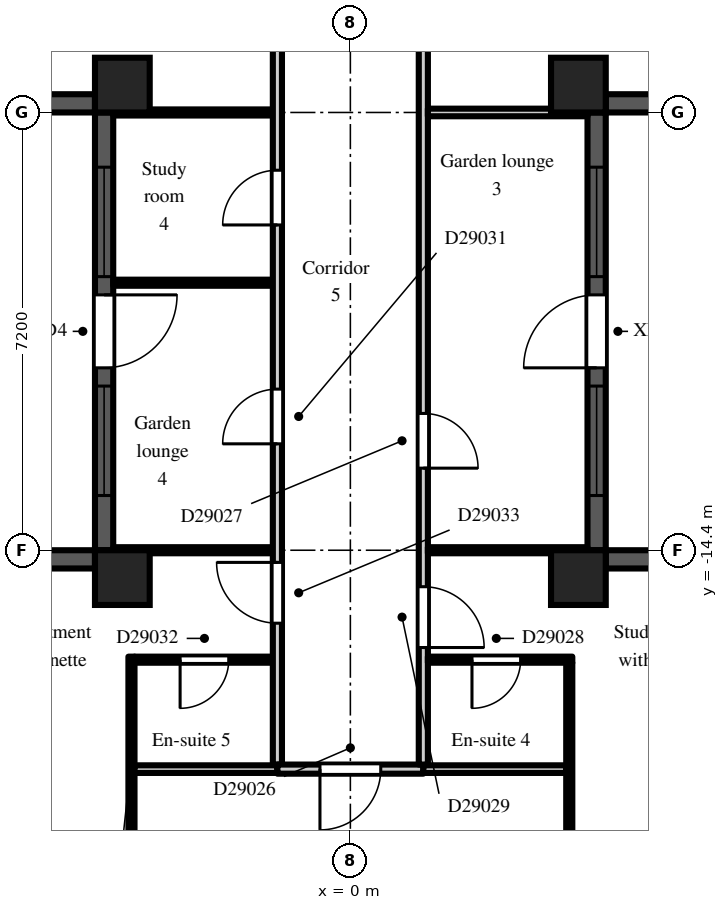
"""IFC4 building model, lengths in metres.
Left out: names, types, materials, properties, quantities, classifications, styles, units other than length and angle.
Written with IfcOpenShell. Run it as: python <this file> out.ifc"""

import sys

from ifc_helpers import new_model, si_unit, direction, frame, frame_2d, origin, origin_2d, place, context, subcontext, project, spatial, rectangle, extrude, element, fill, save


model = new_model("IFC4")
c1 = context("Model", 3, precision=1e-05, world=origin(), true_north=direction((0.0, 1.0)))
c2 = subcontext(c1, "Body", "Model", "MODEL_VIEW")
j1 = project(units=[si_unit("LENGTHUNIT", "METRE"), si_unit("PLANEANGLEUNIT", "RADIAN")], contexts=[c1])
p1 = place(None, origin())
s1 = spatial("IfcSite", under=j1, at=p1, CompositionType="ELEMENT")
p2 = place(p1, origin())
s2 = spatial("IfcBuilding", under=s1, at=p2, CompositionType="ELEMENT")
p3 = place(p2, frame((0.0, 0.0, 198.9)))
s3 = spatial("IfcBuildingStorey", under=s2, at=p3, CompositionType="ELEMENT", Elevation=198.9)
for number, where, z_axis, x_axis in (
    (1, (-3.75, -14.85, 0.0), (0.0, 0.0, 1.0), (1.0, 0.0, 0.0)),
    (2, (-3.75, -6.75, 0.0), (0.0, 0.0, 1.0), (1.0, 0.0, 0.0)),
    (3, (3.75, -14.85, 0.0), (0.0, 0.0, 1.0), (1.0, 0.0, 0.0)),
    (4, (3.75, -6.75, 0.0), (0.0, 0.0, 1.0), (1.0, 0.0, 0.0)),
):
    element("IfcColumn", number, at=place(p3, frame(where, z_axis=z_axis, x_axis=x_axis)), inside=s3, PredefinedType="COLUMN", context=c2, shape_type="SweptSolid", body=[
        extrude(rectangle(XDim=0.9, YDim=0.9, at=origin_2d()), origin(), (0.0, 0.0, 1.0), 3.0),
    ])
p4 = place(p3, frame((-7.2, -7.05, 0.0), z_axis=(0.0, 0.0, 1.0), x_axis=(1.0, 0.0, 0.0)))
e5 = element("IfcWall", 5, at=p4, inside=s3, PredefinedType="SOLIDWALL", context=c2, shape_type="SweptSolid", body=[
    extrude(rectangle(XDim=3.0, YDim=0.3, at=frame_2d((1.5, 0.0))), origin(), (0.0, 0.0, 1.0), 2.3),
])
p5 = place(p3, frame((-4.05, -7.2, 0.0), z_axis=(0.0, 0.0, 1.0), x_axis=(0.0, -1.0, 0.0)))
e6 = element("IfcWall", 6, at=p5, inside=s3, PredefinedType="SOLIDWALL", context=c2, shape_type="SweptSolid", body=[
    extrude(rectangle(XDim=7.2, YDim=0.3, at=frame_2d((3.6, 0.0))), origin(), (0.0, 0.0, 1.0), 2.3),
])
p6 = place(p5, frame((3.0, 0.0, 0.0)))
e7 = element("IfcOpeningElement", 7, at=p6, cuts=e6, PredefinedType="OPENING", context=c2, shape_type="SweptSolid", body=[
    extrude(rectangle(XDim=1.2, YDim=2.05, at=frame_2d((0.6, 1.025))), frame((0.0, 0.16, 0.0), z_axis=(0.0, -1.0, 0.0), x_axis=(1.0, 0.0, 0.0)), (0.0, 0.0, 1.0), 0.32),
])
p7 = place(p5, frame((0.9, 0.0, 0.2)))
e8 = element("IfcOpeningElement", 8, at=p7, cuts=e6, PredefinedType="OPENING", context=c2, shape_type="SweptSolid", body=[
    extrude(rectangle(XDim=1.8, YDim=1.85, at=frame_2d((0.9, 0.925))), frame((0.0, 0.16, 0.0), z_axis=(0.0, -1.0, 0.0), x_axis=(1.0, 0.0, 0.0)), (0.0, 0.0, 1.0), 0.32),
])
p8 = place(p5, frame((4.5, 0.0, 0.2)))
e9 = element("IfcOpeningElement", 9, at=p8, cuts=e6, PredefinedType="OPENING", context=c2, shape_type="SweptSolid", body=[
    extrude(rectangle(XDim=1.8, YDim=1.85, at=frame_2d((0.9, 0.925))), frame((0.0, 0.16, 0.0), z_axis=(0.0, -1.0, 0.0), x_axis=(1.0, 0.0, 0.0)), (0.0, 0.0, 1.0), 0.32),
])
for number, where, z_axis, x_axis in (
    (10, (-4.2, -14.55, 0.0), (0.0, 0.0, 1.0), (-1.0, 0.0, 0.0)),
    (11, (6.3, -14.55, 0.0), (0.0, 0.0, 1.0), (-1.0, 0.0, 0.0)),
):
    element("IfcWall", number, at=place(p3, frame(where, z_axis=z_axis, x_axis=x_axis)), inside=s3, PredefinedType="SOLIDWALL", context=c2, shape_type="SweptSolid", body=[
        extrude(rectangle(XDim=2.1, YDim=0.3, at=frame_2d((1.05, 0.0))), origin(), (0.0, 0.0, 1.0), 2.3),
    ])
p9 = place(p3, frame((4.05, -14.4, 0.0), z_axis=(0.0, 0.0, 1.0), x_axis=(0.0, 1.0, 0.0)))
e12 = element("IfcWall", 12, at=p9, inside=s3, PredefinedType="SOLIDWALL", context=c2, shape_type="SweptSolid", body=[
    extrude(rectangle(XDim=7.2, YDim=0.3, at=frame_2d((3.6, 0.0))), origin(), (0.0, 0.0, 1.0), 2.3),
])
p10 = place(p9, frame((3.0, 0.0, 0.0)))
e13 = element("IfcOpeningElement", 13, at=p10, cuts=e12, PredefinedType="OPENING", context=c2, shape_type="SweptSolid", body=[
    extrude(rectangle(XDim=1.2, YDim=2.05, at=frame_2d((0.6, 1.025))), frame((0.0, 0.16, 0.0), z_axis=(0.0, -1.0, 0.0), x_axis=(1.0, 0.0, 0.0)), (0.0, 0.0, 1.0), 0.32),
])
p11 = place(p9, frame((0.9, 0.0, 0.2)))
e14 = element("IfcOpeningElement", 14, at=p11, cuts=e12, PredefinedType="OPENING", context=c2, shape_type="SweptSolid", body=[
    extrude(rectangle(XDim=1.8, YDim=1.85, at=frame_2d((0.9, 0.925))), frame((0.0, 0.16, 0.0), z_axis=(0.0, -1.0, 0.0), x_axis=(1.0, 0.0, 0.0)), (0.0, 0.0, 1.0), 0.32),
])
p12 = place(p9, frame((4.5, 0.0, 0.2)))
e15 = element("IfcOpeningElement", 15, at=p12, cuts=e12, PredefinedType="OPENING", context=c2, shape_type="SweptSolid", body=[
    extrude(rectangle(XDim=1.8, YDim=1.85, at=frame_2d((0.9, 0.925))), frame((0.0, 0.16, 0.0), z_axis=(0.0, -1.0, 0.0), x_axis=(1.0, 0.0, 0.0)), (0.0, 0.0, 1.0), 0.32),
])
p13 = place(p3, frame((4.2, -7.05, 0.0), z_axis=(0.0, 0.0, 1.0), x_axis=(1.0, 0.0, 0.0)))
e16 = element("IfcWall", 16, at=p13, inside=s3, PredefinedType="SOLIDWALL", context=c2, shape_type="SweptSolid", body=[
    extrude(rectangle(XDim=3.0, YDim=0.3, at=frame_2d((1.5, 0.0))), origin(), (0.0, 0.0, 1.0), 2.3),
])
for number, where, z_axis, x_axis in (
    (17, (-3.9, -14.4, 0.0), (0.0, 0.0, 1.0), (1.0, 0.0, 0.0)),
    (18, (-3.9, -10.0, 0.0), (0.0, 0.0, 1.0), (1.0, 0.0, 0.0)),
    (19, (-3.9, -7.2, 0.0), (0.0, 0.0, 1.0), (1.0, 0.0, 0.0)),
):
    element("IfcWall", number, at=place(p3, frame(where, z_axis=z_axis, x_axis=x_axis)), inside=s3, PredefinedType="PARTITIONING", context=c2, shape_type="SweptSolid", body=[
        extrude(rectangle(XDim=2.625, YDim=0.1, at=frame_2d((1.312, 0.0))), origin(), (0.0, 0.0, 1.0), 2.6),
    ])
p14 = place(p3, frame((-3.6, -19.5, 0.0), z_axis=(0.0, 0.0, 1.0), x_axis=(0.0, 1.0, 0.0)))
e20 = element("IfcWall", 20, at=p14, inside=s3, PredefinedType="PARTITIONING", context=c2, shape_type="SweptSolid", body=[
    extrude(rectangle(XDim=3.35, YDim=0.1, at=frame_2d((1.675, 0.0))), origin(), (0.0, 0.0, 1.0), 2.6),
])
p15 = place(p3, frame((-3.55, -18.0, 0.0), z_axis=(0.0, 0.0, 1.0), x_axis=(1.0, 0.0, 0.0)))
e21 = element("IfcWall", 21, at=p15, inside=s3, PredefinedType="PARTITIONING", context=c2, shape_type="SweptSolid", body=[
    extrude(rectangle(XDim=2.35, YDim=0.125, at=frame_2d((1.175, 0.0))), origin(), (0.0, 0.0, 1.0), 2.6),
])
p16 = place(p3, frame((-3.55, -16.2, 0.0), z_axis=(0.0, 0.0, 1.0), x_axis=(1.0, 0.0, 0.0)))
e22 = element("IfcWall", 22, at=p16, inside=s3, PredefinedType="PARTITIONING", context=c2, shape_type="SweptSolid", body=[
    extrude(rectangle(XDim=2.275, YDim=0.1, at=frame_2d((1.138, 0.0))), origin(), (0.0, 0.0, 1.0), 2.6),
])
p17 = place(p16, frame((0.75, 0.0, 0.0)))
e23 = element("IfcOpeningElement", 23, at=p17, cuts=e22, PredefinedType="OPENING", context=c2, shape_type="SweptSolid", body=[
    extrude(rectangle(XDim=0.8, YDim=2.1, at=frame_2d((0.4, 1.05))), frame((0.0, 0.06, 0.0), z_axis=(0.0, -1.0, 0.0), x_axis=(1.0, 0.0, 0.0)), (0.0, 0.0, 1.0), 0.12),
])
p18 = place(p3, frame((-1.2, -17.925, 0.0), z_axis=(0.0, 0.0, 1.0), x_axis=(0.0, 1.0, 0.0)))
e24 = element("IfcWall", 24, at=p18, inside=s3, PredefinedType="PARTITIONING", context=c2, shape_type="SweptSolid", body=[
    extrude(rectangle(XDim=16.65, YDim=0.15, at=frame_2d((8.325, 0.0))), origin(), (0.0, 0.0, 1.0), 2.6),
])
p19 = place(p18, frame((12.175, 0.0, 0.0)))
e25 = element("IfcOpeningElement", 25, at=p19, cuts=e24, PredefinedType="OPENING", context=c2, shape_type="SweptSolid", body=[
    extrude(rectangle(XDim=0.9, YDim=2.1, at=frame_2d((0.45, 1.05))), frame((0.0, 0.085, 0.0), z_axis=(0.0, -1.0, 0.0), x_axis=(1.0, 0.0, 0.0)), (0.0, 0.0, 1.0), 0.17),
])
p20 = place(p18, frame((8.875, 0.0, 0.0)))
e26 = element("IfcOpeningElement", 26, at=p20, cuts=e24, PredefinedType="OPENING", context=c2, shape_type="SweptSolid", body=[
    extrude(rectangle(XDim=0.9, YDim=2.1, at=frame_2d((0.45, 1.05))), frame((0.0, 0.085, 0.0), z_axis=(0.0, -1.0, 0.0), x_axis=(1.0, 0.0, 0.0)), (0.0, 0.0, 1.0), 0.17),
])
p21 = place(p18, frame((5.275, 0.0, 0.0)))
e27 = element("IfcOpeningElement", 27, at=p21, cuts=e24, PredefinedType="OPENING", context=c2, shape_type="SweptSolid", body=[
    extrude(rectangle(XDim=0.9, YDim=2.1, at=frame_2d((0.45, 1.05))), frame((0.0, 0.085, 0.0), z_axis=(0.0, -1.0, 0.0), x_axis=(1.0, 0.0, 0.0)), (0.0, 0.0, 1.0), 0.17),
])
p22 = place(p18, frame((2.325, 0.0, 0.0)))
e28 = element("IfcOpeningElement", 28, at=p22, cuts=e24, PredefinedType="OPENING", context=c2, shape_type="SweptSolid", body=[
    extrude(rectangle(XDim=1.0, YDim=2.1, at=frame_2d((0.5, 1.05))), frame((0.0, 0.085, 0.0), z_axis=(0.0, -1.0, 0.0), x_axis=(1.0, 0.0, 0.0)), (0.0, 0.0, 1.0), 0.17),
])
p23 = place(p3, frame((-1.2, -18.0, 0.0), z_axis=(0.0, 0.0, 1.0), x_axis=(1.0, 0.0, 0.0)))
e29 = element("IfcWall", 29, at=p23, inside=s3, PredefinedType="PARTITIONING", context=c2, shape_type="SweptSolid", body=[
    extrude(rectangle(XDim=2.4, YDim=0.15, at=frame_2d((1.2, 0.0))), origin(), (0.0, 0.0, 1.0), 2.6),
])
p24 = place(p23, frame((0.7, 0.0, 0.0)))
e30 = element("IfcOpeningElement", 30, at=p24, cuts=e29, PredefinedType="OPENING", context=c2, shape_type="SweptSolid", body=[
    extrude(rectangle(XDim=1.0, YDim=2.1, at=frame_2d((0.5, 1.05))), frame((0.0, 0.085, 0.0), z_axis=(0.0, -1.0, 0.0), x_axis=(1.0, 0.0, 0.0)), (0.0, 0.0, 1.0), 0.17),
])
p25 = place(p3, frame((1.2, -17.925, 0.0), z_axis=(0.0, 0.0, 1.0), x_axis=(0.0, 1.0, 0.0)))
e31 = element("IfcWall", 31, at=p25, inside=s3, PredefinedType="PARTITIONING", context=c2, shape_type="SweptSolid", body=[
    extrude(rectangle(XDim=16.8, YDim=0.15, at=frame_2d((8.4, 0.0))), origin(), (0.0, 0.0, 1.0), 2.6),
])
p26 = place(p25, frame((15.075, 0.0, 0.0)))
e32 = element("IfcOpeningElement", 32, at=p26, cuts=e31, PredefinedType="OPENING", context=c2, shape_type="SweptSolid", body=[
    extrude(rectangle(XDim=0.9, YDim=2.1, at=frame_2d((0.45, 1.05))), frame((0.0, 0.085, 0.0), z_axis=(0.0, -1.0, 0.0), x_axis=(1.0, 0.0, 0.0)), (0.0, 0.0, 1.0), 0.17),
])
p27 = place(p25, frame((12.075, 0.0, 0.0)))
e33 = element("IfcOpeningElement", 33, at=p27, cuts=e31, PredefinedType="OPENING", context=c2, shape_type="SweptSolid", body=[
    extrude(rectangle(XDim=0.9, YDim=2.1, at=frame_2d((0.45, 1.05))), frame((0.0, 0.085, 0.0), z_axis=(0.0, -1.0, 0.0), x_axis=(1.0, 0.0, 0.0)), (0.0, 0.0, 1.0), 0.17),
])
p28 = place(p25, frame((4.875, 0.0, 0.0)))
e34 = element("IfcOpeningElement", 34, at=p28, cuts=e31, PredefinedType="OPENING", context=c2, shape_type="SweptSolid", body=[
    extrude(rectangle(XDim=0.9, YDim=2.1, at=frame_2d((0.45, 1.05))), frame((0.0, 0.085, 0.0), z_axis=(0.0, -1.0, 0.0), x_axis=(1.0, 0.0, 0.0)), (0.0, 0.0, 1.0), 0.17),
])
p29 = place(p25, frame((1.925, 0.0, 0.0)))
e35 = element("IfcOpeningElement", 35, at=p29, cuts=e31, PredefinedType="OPENING", context=c2, shape_type="SweptSolid", body=[
    extrude(rectangle(XDim=1.0, YDim=2.1, at=frame_2d((0.5, 1.05))), frame((0.0, 0.085, 0.0), z_axis=(0.0, -1.0, 0.0), x_axis=(1.0, 0.0, 0.0)), (0.0, 0.0, 1.0), 0.17),
])
p30 = place(p3, frame((1.2, -18.0, 0.0), z_axis=(0.0, 0.0, 1.0), x_axis=(1.0, 0.0, 0.0)))
e36 = element("IfcWall", 36, at=p30, inside=s3, PredefinedType="PARTITIONING", context=c2, shape_type="SweptSolid", body=[
    extrude(rectangle(XDim=2.35, YDim=0.125, at=frame_2d((1.175, 0.0))), origin(), (0.0, 0.0, 1.0), 2.6),
])
p31 = place(p3, frame((1.275, -16.2, 0.0), z_axis=(0.0, 0.0, 1.0), x_axis=(1.0, 0.0, 0.0)))
e37 = element("IfcWall", 37, at=p31, inside=s3, PredefinedType="PARTITIONING", context=c2, shape_type="SweptSolid", body=[
    extrude(rectangle(XDim=2.375, YDim=0.1, at=frame_2d((1.188, 0.0))), origin(), (0.0, 0.0, 1.0), 2.6),
])
p32 = place(p31, frame((0.725, 0.0, 0.0)))
e38 = element("IfcOpeningElement", 38, at=p32, cuts=e37, PredefinedType="OPENING", context=c2, shape_type="SweptSolid", body=[
    extrude(rectangle(XDim=0.8, YDim=2.1, at=frame_2d((0.4, 1.05))), frame((0.0, 0.06, 0.0), z_axis=(0.0, -1.0, 0.0), x_axis=(1.0, 0.0, 0.0)), (0.0, 0.0, 1.0), 0.12),
])
p33 = place(p3, frame((1.275, -14.4, 0.0), z_axis=(0.0, 0.0, 1.0), x_axis=(1.0, 0.0, 0.0)))
e39 = element("IfcWall", 39, at=p33, inside=s3, PredefinedType="PARTITIONING", context=c2, shape_type="SweptSolid", body=[
    extrude(rectangle(XDim=2.625, YDim=0.1, at=frame_2d((1.312, 0.0))), origin(), (0.0, 0.0, 1.0), 2.6),
])
p34 = place(p3, frame((1.275, -7.2, 0.0), z_axis=(0.0, 0.0, 1.0), x_axis=(1.0, 0.0, 0.0)))
e40 = element("IfcWall", 40, at=p34, inside=s3, PredefinedType="PARTITIONING", context=c2, shape_type="SweptSolid", body=[
    extrude(rectangle(XDim=2.625, YDim=0.125, at=frame_2d((1.312, 0.0))), origin(), (0.0, 0.0, 1.0), 2.6),
])
p35 = place(p3, frame((3.6, -19.5, 0.0), z_axis=(0.0, 0.0, 1.0), x_axis=(0.0, 1.0, 0.0)))
e41 = element("IfcWall", 41, at=p35, inside=s3, PredefinedType="PARTITIONING", context=c2, shape_type="SweptSolid", body=[
    extrude(rectangle(XDim=3.25, YDim=0.1, at=frame_2d((1.625, 0.0))), origin(), (0.0, 0.0, 1.0), 2.6),
])
p36 = place(p6, origin())
e42 = element("IfcDoor", 42, at=p36, inside=s3, OperationType="SINGLE_SWING_LEFT", PredefinedType="DOOR", context=c2, shape_type="SweptSolid", body=[
    extrude(rectangle(XDim=1.2, YDim=2.05, at=frame_2d((0.6, 1.025))), frame((0.0, 0.025, 0.0), z_axis=(0.0, -1.0, 0.0), x_axis=(1.0, 0.0, 0.0)), (0.0, 0.0, 1.0), 0.05),
])
fill(e7, e42)
p37 = place(p7, origin())
e43 = element("IfcWindow", 43, at=p37, inside=s3, PartitioningType="SINGLE_PANEL", PredefinedType="WINDOW", context=c2, shape_type="SweptSolid", body=[
    extrude(rectangle(XDim=1.8, YDim=1.85, at=frame_2d((0.9, 0.925))), frame((0.0, 0.03, 0.0), z_axis=(0.0, -1.0, 0.0), x_axis=(1.0, 0.0, 0.0)), (0.0, 0.0, 1.0), 0.06),
])
fill(e8, e43)
p38 = place(p8, origin())
e44 = element("IfcWindow", 44, at=p38, inside=s3, PartitioningType="SINGLE_PANEL", PredefinedType="WINDOW", context=c2, shape_type="SweptSolid", body=[
    extrude(rectangle(XDim=1.8, YDim=1.85, at=frame_2d((0.9, 0.925))), frame((0.0, 0.03, 0.0), z_axis=(0.0, -1.0, 0.0), x_axis=(1.0, 0.0, 0.0)), (0.0, 0.0, 1.0), 0.06),
])
fill(e9, e44)
p39 = place(p10, origin())
e45 = element("IfcDoor", 45, at=p39, inside=s3, OperationType="SINGLE_SWING_LEFT", PredefinedType="DOOR", context=c2, shape_type="SweptSolid", body=[
    extrude(rectangle(XDim=1.2, YDim=2.05, at=frame_2d((0.6, 1.025))), frame((0.0, 0.025, 0.0), z_axis=(0.0, -1.0, 0.0), x_axis=(1.0, 0.0, 0.0)), (0.0, 0.0, 1.0), 0.05),
])
fill(e13, e45)
p40 = place(p11, origin())
e46 = element("IfcWindow", 46, at=p40, inside=s3, PartitioningType="SINGLE_PANEL", PredefinedType="WINDOW", context=c2, shape_type="SweptSolid", body=[
    extrude(rectangle(XDim=1.8, YDim=1.85, at=frame_2d((0.9, 0.925))), frame((0.0, 0.03, 0.0), z_axis=(0.0, -1.0, 0.0), x_axis=(1.0, 0.0, 0.0)), (0.0, 0.0, 1.0), 0.06),
])
fill(e14, e46)
p41 = place(p12, origin())
e47 = element("IfcWindow", 47, at=p41, inside=s3, PartitioningType="SINGLE_PANEL", PredefinedType="WINDOW", context=c2, shape_type="SweptSolid", body=[
    extrude(rectangle(XDim=1.8, YDim=1.85, at=frame_2d((0.9, 0.925))), frame((0.0, 0.03, 0.0), z_axis=(0.0, -1.0, 0.0), x_axis=(1.0, 0.0, 0.0)), (0.0, 0.0, 1.0), 0.06),
])
fill(e15, e47)
p42 = place(p24, frame((1.0, 0.0, 0.0), z_axis=(0.0, 0.0, 1.0), x_axis=(-1.0, 0.0, 0.0)))
e48 = element("IfcDoor", 48, at=p42, inside=s3, OperationType="SINGLE_SWING_RIGHT", PredefinedType="DOOR", context=c2, shape_type="SweptSolid", body=[
    extrude(rectangle(XDim=1.0, YDim=2.1, at=frame_2d((0.5, 1.05))), frame((0.0, 0.025, 0.0), z_axis=(0.0, -1.0, 0.0), x_axis=(1.0, 0.0, 0.0)), (0.0, 0.0, 1.0), 0.05),
])
fill(e30, e48)
p43 = place(p28, frame((0.9, 0.0, 0.0), z_axis=(0.0, 0.0, 1.0), x_axis=(-1.0, 0.0, 0.0)))
e49 = element("IfcDoor", 49, at=p43, inside=s3, OperationType="SINGLE_SWING_RIGHT", PredefinedType="DOOR", context=c2, shape_type="SweptSolid", body=[
    extrude(rectangle(XDim=0.9, YDim=2.1, at=frame_2d((0.45, 1.05))), frame((0.0, 0.025, 0.0), z_axis=(0.0, -1.0, 0.0), x_axis=(1.0, 0.0, 0.0)), (0.0, 0.0, 1.0), 0.05),
])
fill(e34, e49)
p44 = place(p32, frame((0.8, 0.0, 0.0), z_axis=(0.0, 0.0, 1.0), x_axis=(-1.0, 0.0, 0.0)))
e50 = element("IfcDoor", 50, at=p44, inside=s3, OperationType="SINGLE_SWING_RIGHT", PredefinedType="DOOR", context=c2, shape_type="SweptSolid", body=[
    extrude(rectangle(XDim=0.8, YDim=2.1, at=frame_2d((0.4, 1.05))), frame((0.0, 0.025, 0.0), z_axis=(0.0, -1.0, 0.0), x_axis=(1.0, 0.0, 0.0)), (0.0, 0.0, 1.0), 0.05),
])
fill(e38, e50)
p45 = place(p29, frame((1.0, 0.0, 0.0), z_axis=(0.0, 0.0, 1.0), x_axis=(-1.0, 0.0, 0.0)))
e51 = element("IfcDoor", 51, at=p45, inside=s3, OperationType="SINGLE_SWING_RIGHT", PredefinedType="DOOR", context=c2, shape_type="SweptSolid", body=[
    extrude(rectangle(XDim=1.0, YDim=2.1, at=frame_2d((0.5, 1.05))), frame((0.0, 0.025, 0.0), z_axis=(0.0, -1.0, 0.0), x_axis=(1.0, 0.0, 0.0)), (0.0, 0.0, 1.0), 0.05),
])
fill(e35, e51)
p46 = place(p20, origin())
e52 = element("IfcDoor", 52, at=p46, inside=s3, OperationType="SINGLE_SWING_LEFT", PredefinedType="DOOR", context=c2, shape_type="SweptSolid", body=[
    extrude(rectangle(XDim=0.9, YDim=2.1, at=frame_2d((0.45, 1.05))), frame((0.0, 0.025, 0.0), z_axis=(0.0, -1.0, 0.0), x_axis=(1.0, 0.0, 0.0)), (0.0, 0.0, 1.0), 0.05),
])
fill(e26, e52)
p47 = place(p21, origin())
e53 = element("IfcDoor", 53, at=p47, inside=s3, OperationType="SINGLE_SWING_LEFT", PredefinedType="DOOR", context=c2, shape_type="SweptSolid", body=[
    extrude(rectangle(XDim=0.9, YDim=2.1, at=frame_2d((0.45, 1.05))), frame((0.0, 0.025, 0.0), z_axis=(0.0, -1.0, 0.0), x_axis=(1.0, 0.0, 0.0)), (0.0, 0.0, 1.0), 0.05),
])
fill(e27, e53)
p48 = place(p17, frame((0.8, 0.0, 0.0), z_axis=(0.0, 0.0, 1.0), x_axis=(-1.0, 0.0, 0.0)))
e54 = element("IfcDoor", 54, at=p48, inside=s3, OperationType="SINGLE_SWING_RIGHT", PredefinedType="DOOR", context=c2, shape_type="SweptSolid", body=[
    extrude(rectangle(XDim=0.8, YDim=2.1, at=frame_2d((0.4, 1.05))), frame((0.0, 0.025, 0.0), z_axis=(0.0, -1.0, 0.0), x_axis=(1.0, 0.0, 0.0)), (0.0, 0.0, 1.0), 0.05),
])
fill(e23, e54)
p49 = place(p22, origin())
e55 = element("IfcDoor", 55, at=p49, inside=s3, OperationType="SINGLE_SWING_RIGHT", PredefinedType="DOOR", context=c2, shape_type="SweptSolid", body=[
    extrude(rectangle(XDim=1.0, YDim=2.1, at=frame_2d((0.5, 1.05))), frame((0.0, 0.025, 0.0), z_axis=(0.0, -1.0, 0.0), x_axis=(1.0, 0.0, 0.0)), (0.0, 0.0, 1.0), 0.05),
])
fill(e28, e55)
save(model, sys.argv[1])
